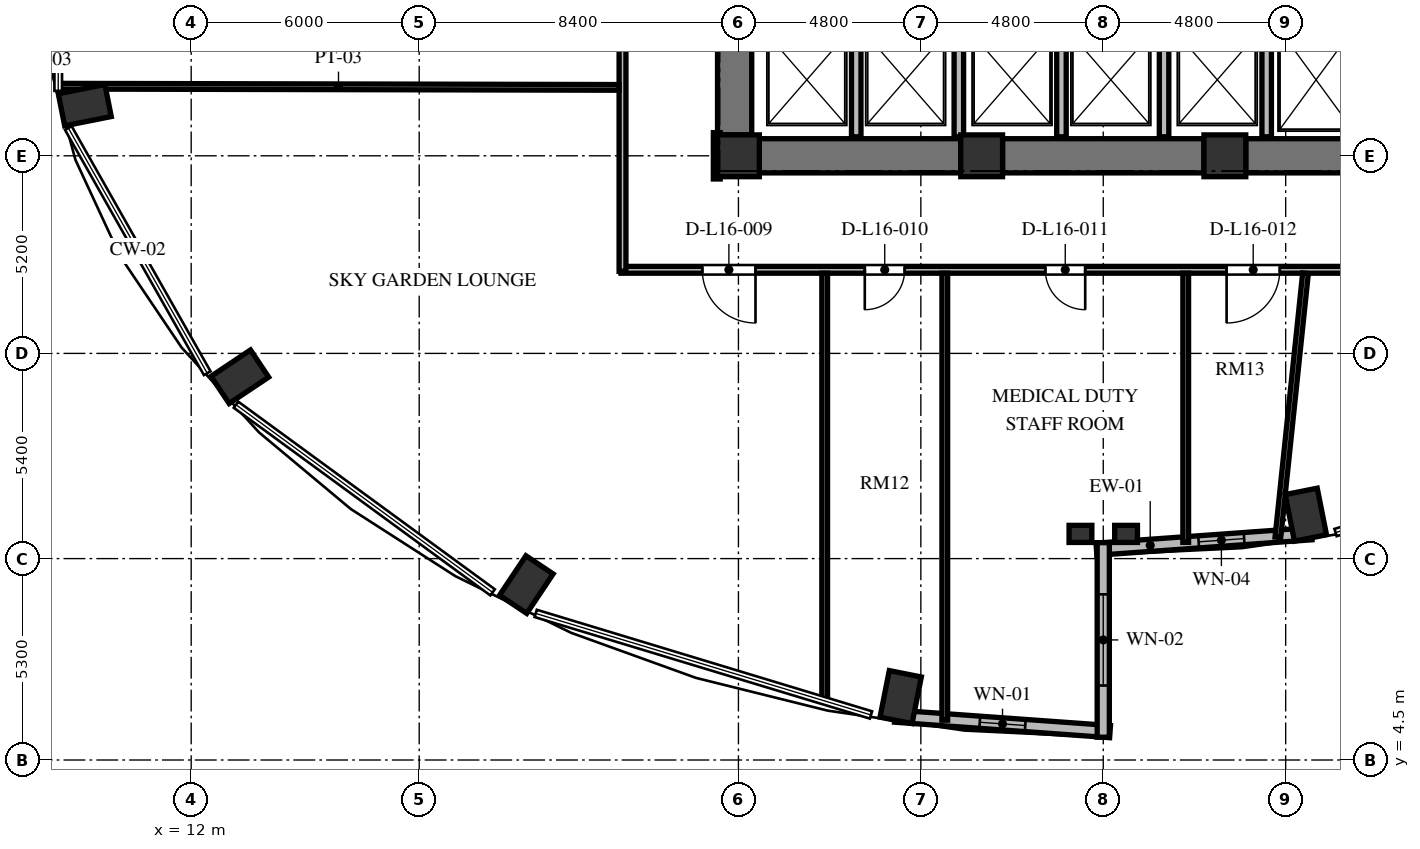
"""IFC4 building model, lengths in metres.
Left out: names, types, materials, properties, quantities, classifications, styles, units other than length and angle.
Written with IfcOpenShell. Run it as: python <this file> out.ifc"""

import sys

from ifc_helpers import new_model, si_unit, direction, frame, frame_2d, origin, origin_2d, place, context, subcontext, project, spatial, rectangle, extrude, element, fill, save


model = new_model("IFC4")
c1 = context("Model", 3, precision=1e-05, world=origin(), true_north=direction((0.0, 1.0)))
c2 = subcontext(c1, "Body", "Model", "MODEL_VIEW")
j1 = project(units=[si_unit("LENGTHUNIT", "METRE"), si_unit("PLANEANGLEUNIT", "RADIAN")], contexts=[c1])
p1 = place(None, origin())
s1 = spatial("IfcSite", under=j1, at=p1, CompositionType="ELEMENT")
p2 = place(p1, origin())
s2 = spatial("IfcBuilding", under=s1, at=p2, CompositionType="ELEMENT")
p3 = place(p2, frame((0.0, 0.0, 65.328)))
s3 = spatial("IfcBuildingStorey", under=s2, at=p3, CompositionType="ELEMENT", Elevation=65.328)
for number, where, z_axis, x_axis in (
    (1, (41.331, 10.956, 0.0), (0.0, 0.0, 1.0), (0.195, -0.981, 0.0)),
    (2, (9.2, 21.732, 0.0), (0.0, 0.0, 1.0), (-0.981, -0.195, 0.0)),
    (3, (13.28, 14.586, 0.0), (0.0, 0.0, 1.0), (-0.831, -0.556, 0.0)),
    (4, (20.819, 9.116, 0.0), (0.0, 0.0, 1.0), (-0.556, -0.831, 0.0)),
    (5, (30.669, 6.156, 0.0), (0.0, 0.0, 1.0), (-0.195, -0.981, 0.0)),
):
    element("IfcColumn", number, at=place(p3, frame(where, z_axis=z_axis, x_axis=x_axis)), inside=s3, PredefinedType="COLUMN", context=c2, shape_type="SweptSolid", body=[
        extrude(rectangle(XDim=1.25, YDim=0.86, at=origin_2d()), origin(), (0.0, 0.0, 1.0), 3.648),
    ])
for number, where, z_axis, x_axis in (
    (6, (26.4, 20.4, 0.0), (0.0, 0.0, 1.0), (1.0, 0.0, 0.0)),
    (7, (32.8, 20.4, 0.0), (0.0, 0.0, 1.0), (1.0, 0.0, 0.0)),
    (8, (39.2, 20.4, 0.0), (0.0, 0.0, 1.0), (1.0, 0.0, 0.0)),
):
    element("IfcColumn", number, at=place(p3, frame(where, z_axis=z_axis, x_axis=x_axis)), inside=s3, PredefinedType="COLUMN", context=c2, shape_type="SweptSolid", body=[
        extrude(rectangle(XDim=1.1, YDim=1.1, at=origin_2d()), origin(), (0.0, 0.0, 1.0), 3.648),
    ])
for number, where, z_axis, x_axis in (
    (9, (35.4, 10.45, 0.0), (0.0, 0.0, 1.0), (1.0, 0.0, 0.0)),
    (10, (36.6, 10.45, 0.0), (0.0, 0.0, 1.0), (1.0, 0.0, 0.0)),
):
    element("IfcColumn", number, at=place(p3, frame(where, z_axis=z_axis, x_axis=x_axis)), inside=s3, PredefinedType="PILASTER", context=c2, shape_type="SweptSolid", body=[
        extrude(rectangle(XDim=0.6, YDim=0.45, at=origin_2d()), origin(), (0.0, 0.0, 1.0), 3.648),
    ])
p4 = place(p3, frame((26.3, 20.95, 0.0), z_axis=(0.0, 0.0, 1.0), x_axis=(0.0, 1.0, 0.0)))
e11 = element("IfcWall", 11, at=p4, inside=s3, PredefinedType="SHEAR", context=c2, shape_type="SweptSolid", body=[
    extrude(rectangle(XDim=14.1, YDim=0.9, at=frame_2d((7.05, 0.0))), origin(), (0.0, 0.0, 1.0), 3.648),
])
p5 = place(p4, frame((6.5, 0.0, 0.0)))
e12 = element("IfcOpeningElement", 12, at=p5, cuts=e11, PredefinedType="OPENING", context=c2, shape_type="SweptSolid", body=[
    extrude(rectangle(XDim=1.2, YDim=2.15, at=frame_2d((0.6, 1.075))), frame((0.0, 0.46, 0.0), z_axis=(0.0, -1.0, 0.0), x_axis=(1.0, 0.0, 0.0)), (0.0, 0.0, 1.0), 0.92),
])
p6 = place(p4, frame((9.6, 0.0, 0.0)))
e13 = element("IfcOpeningElement", 13, at=p6, cuts=e11, PredefinedType="OPENING", context=c2, shape_type="SweptSolid", body=[
    extrude(rectangle(XDim=1.3, YDim=2.2, at=frame_2d((0.65, 1.1))), frame((0.0, 0.46, 0.0), z_axis=(0.0, -1.0, 0.0), x_axis=(1.0, 0.0, 0.0)), (0.0, 0.0, 1.0), 0.92),
])
p7 = place(p4, frame((3.26, 0.0, 0.0)))
e14 = element("IfcOpeningElement", 14, at=p7, cuts=e11, PredefinedType="OPENING", context=c2, shape_type="SweptSolid", body=[
    extrude(rectangle(XDim=1.3, YDim=2.2, at=frame_2d((0.65, 1.1))), frame((0.0, 0.46, 0.0), z_axis=(0.0, -1.0, 0.0), x_axis=(1.0, 0.0, 0.0)), (0.0, 0.0, 1.0), 0.92),
])
p8 = place(p3, frame((26.95, 20.4, 0.0), z_axis=(0.0, 0.0, 1.0), x_axis=(1.0, 0.0, 0.0)))
e15 = element("IfcWall", 15, at=p8, inside=s3, PredefinedType="SHEAR", context=c2, shape_type="SweptSolid", body=[
    extrude(rectangle(XDim=5.3, YDim=0.9, at=frame_2d((2.65, 0.0))), origin(), (0.0, 0.0, 1.0), 3.648),
])
p9 = place(p3, frame((33.35, 20.4, 0.0), z_axis=(0.0, 0.0, 1.0), x_axis=(1.0, 0.0, 0.0)))
e16 = element("IfcWall", 16, at=p9, inside=s3, PredefinedType="SHEAR", context=c2, shape_type="SweptSolid", body=[
    extrude(rectangle(XDim=5.3, YDim=0.9, at=frame_2d((2.65, 0.0))), origin(), (0.0, 0.0, 1.0), 3.648),
])
p10 = place(p3, frame((39.75, 20.4, 0.0), z_axis=(0.0, 0.0, 1.0), x_axis=(1.0, 0.0, 0.0)))
e17 = element("IfcWall", 17, at=p10, inside=s3, PredefinedType="SHEAR", context=c2, shape_type="SweptSolid", body=[
    extrude(rectangle(XDim=5.3, YDim=0.9, at=frame_2d((2.65, 0.0))), origin(), (0.0, 0.0, 1.0), 3.648),
])
p11 = place(p3, frame((35.821, 10.047, 0.0), z_axis=(0.0, 0.0, 1.0), x_axis=(0.997422321809, 0.071754525696, 0.0)))
e18 = element("IfcWall", 18, at=p11, inside=s3, PredefinedType="SOLIDWALL", context=c2, shape_type="SweptSolid", body=[
    extrude(rectangle(XDim=5.675, YDim=0.32, at=frame_2d((2.838, 0.0))), origin(), (0.0, 0.0, 1.0), 3.428),
])
p12 = place(p11, frame((2.697, 0.0, 0.85)))
e19 = element("IfcOpeningElement", 19, at=p12, cuts=e18, PredefinedType="OPENING", context=c2, shape_type="SweptSolid", body=[
    extrude(rectangle(XDim=1.2, YDim=1.8, at=frame_2d((0.6, 0.9))), frame((0.0, 0.17, 0.0), z_axis=(0.0, -1.0, 0.0), x_axis=(1.0, 0.0, 0.0)), (0.0, 0.0, 1.0), 0.34),
])
p13 = place(p3, frame((30.519, 5.654, 0.0), z_axis=(0.0, 0.0, 1.0), x_axis=(0.997421878774, -0.071760683825, 0.0)))
e20 = element("IfcWall", 20, at=p13, inside=s3, PredefinedType="SOLIDWALL", context=c2, shape_type="SweptSolid", body=[
    extrude(rectangle(XDim=5.675, YDim=0.32, at=frame_2d((2.837, 0.0))), origin(), (0.0, 0.0, 1.0), 3.428),
])
p14 = place(p13, frame((2.237, 0.0, 0.85)))
e21 = element("IfcOpeningElement", 21, at=p14, cuts=e20, PredefinedType="OPENING", context=c2, shape_type="SweptSolid", body=[
    extrude(rectangle(XDim=1.2, YDim=2.2, at=frame_2d((0.6, 1.1))), frame((0.0, 0.17, 0.0), z_axis=(0.0, -1.0, 0.0), x_axis=(1.0, 0.0, 0.0)), (0.0, 0.0, 1.0), 0.34),
])
p15 = place(p3, frame((36.0, 5.1, 0.0), z_axis=(0.0, 0.0, 1.0), x_axis=(0.0, 1.0, 0.0)))
e22 = element("IfcWall", 22, at=p15, inside=s3, PredefinedType="SOLIDWALL", context=c2, shape_type="SweptSolid", body=[
    extrude(rectangle(XDim=5.12, YDim=0.32, at=frame_2d((2.56, 0.0))), origin(), (0.0, 0.0, 1.0), 3.428),
])
p16 = place(p15, frame((1.36, 0.0, 0.84)))
e23 = element("IfcOpeningElement", 23, at=p16, cuts=e22, PredefinedType="OPENING", context=c2, shape_type="SweptSolid", body=[
    extrude(rectangle(XDim=2.4, YDim=2.04, at=frame_2d((1.2, 1.02))), frame((0.0, 0.17, 0.0), z_axis=(0.0, -1.0, 0.0), x_axis=(1.0, 0.0, 0.0)), (0.0, 0.0, 1.0), 0.34),
])
for number, where, z_axis, x_axis in (
    (24, (29.5, 20.9, 0.0), (0.0, 0.0, 1.0), (0.0, 1.0, 0.0)),
    (25, (32.2, 20.9, 0.0), (0.0, 0.0, 1.0), (0.0, 1.0, 0.0)),
    (26, (34.9, 20.9, 0.0), (0.0, 0.0, 1.0), (0.0, 1.0, 0.0)),
    (27, (37.6, 20.9, 0.0), (0.0, 0.0, 1.0), (0.0, 1.0, 0.0)),
    (28, (40.3, 20.9, 0.0), (0.0, 0.0, 1.0), (0.0, 1.0, 0.0)),
):
    element("IfcWall", number, at=place(p3, frame(where, z_axis=z_axis, x_axis=x_axis)), inside=s3, PredefinedType="SOLIDWALL", context=c2, shape_type="SweptSolid", body=[
        extrude(rectangle(XDim=2.8, YDim=0.25, at=frame_2d((1.4, 0.0))), origin(), (0.0, 0.0, 1.0), 3.428),
    ])
p17 = place(p3, frame((25.83, 21.01, 0.0), z_axis=(0.0, 0.0, 1.0), x_axis=(0.0, -1.0, 0.0)))
e29 = element("IfcWall", 29, at=p17, inside=s3, PredefinedType="PARTITIONING", context=c2, shape_type="SweptSolid", body=[
    extrude(rectangle(XDim=1.22, YDim=0.18, at=frame_2d((0.61, 0.0))), origin(), (0.0, 0.0, 1.0), 3.428),
])
p18 = place(p3, frame((45.24, 17.4, 0.0), z_axis=(0.0, 0.0, 1.0), x_axis=(-1.0, 0.0, 0.0)))
e30 = element("IfcWall", 30, at=p18, inside=s3, PredefinedType="PARTITIONING", context=c2, shape_type="SweptSolid", body=[
    extrude(rectangle(XDim=21.93, YDim=0.18, at=frame_2d((10.965, 0.0))), origin(), (0.0, 0.0, 1.0), 3.053),
])
p19 = place(p18, frame((18.391, 0.0, 0.0)))
e31 = element("IfcOpeningElement", 31, at=p19, cuts=e30, PredefinedType="OPENING", context=c2, shape_type="SweptSolid", body=[
    extrude(rectangle(XDim=1.4, YDim=2.2, at=frame_2d((0.7, 1.1))), frame((0.0, 0.1, 0.0), z_axis=(0.0, -1.0, 0.0), x_axis=(1.0, 0.0, 0.0)), (0.0, 0.0, 1.0), 0.2),
])
p20 = place(p18, frame((14.465, 0.0, 0.0)))
e32 = element("IfcOpeningElement", 32, at=p20, cuts=e30, PredefinedType="OPENING", context=c2, shape_type="SweptSolid", body=[
    extrude(rectangle(XDim=1.05, YDim=2.15, at=frame_2d((0.525, 1.075))), frame((0.0, 0.1, 0.0), z_axis=(0.0, -1.0, 0.0), x_axis=(1.0, 0.0, 0.0)), (0.0, 0.0, 1.0), 0.2),
])
p21 = place(p18, frame((9.715, 0.0, 0.0)))
e33 = element("IfcOpeningElement", 33, at=p21, cuts=e30, PredefinedType="OPENING", context=c2, shape_type="SweptSolid", body=[
    extrude(rectangle(XDim=1.05, YDim=2.15, at=frame_2d((0.525, 1.075))), frame((0.0, 0.1, 0.0), z_axis=(0.0, -1.0, 0.0), x_axis=(1.0, 0.0, 0.0)), (0.0, 0.0, 1.0), 0.2),
])
p22 = place(p18, frame((4.594, 0.0, 0.0)))
e34 = element("IfcOpeningElement", 34, at=p22, cuts=e30, PredefinedType="OPENING", context=c2, shape_type="SweptSolid", body=[
    extrude(rectangle(XDim=1.4, YDim=2.2, at=frame_2d((0.7, 1.1))), frame((0.0, 0.1, 0.0), z_axis=(0.0, -1.0, 0.0), x_axis=(1.0, 0.0, 0.0)), (0.0, 0.0, 1.0), 0.2),
])
p23 = place(p3, frame((23.35, 17.36, 0.0), z_axis=(0.0, 0.0, 1.0), x_axis=(0.0, 1.0, 0.0)))
e35 = element("IfcWall", 35, at=p23, inside=s3, PredefinedType="PARTITIONING", context=c2, shape_type="SweptSolid", body=[
    extrude(rectangle(XDim=9.28, YDim=0.18, at=frame_2d((4.64, 0.0))), origin(), (0.0, 0.0, 1.0), 3.428),
])
p24 = place(p3, frame((8.493, 22.231, 0.0), z_axis=(0.0, 0.0, 1.0), x_axis=(0.999997760873, -0.002116187438, 0.0)))
e36 = element("IfcWall", 36, at=p24, inside=s3, PredefinedType="PARTITIONING", context=c2, shape_type="SweptSolid", body=[
    extrude(rectangle(XDim=14.767, YDim=0.15, at=frame_2d((7.384, 0.0))), origin(), (0.0, 0.0, 1.0), 3.428),
])
p25 = place(p3, frame((28.67, 6.067, 0.0), z_axis=(0.0, 0.0, 1.0), x_axis=(0.0, 1.0, 0.0)))
e37 = element("IfcWall", 37, at=p25, inside=s3, PredefinedType="PARTITIONING", context=c2, shape_type="SweptSolid", body=[
    extrude(rectangle(XDim=11.243, YDim=0.15, at=frame_2d((5.622, 0.0))), origin(), (0.0, 0.0, 1.0), 3.428),
])
p26 = place(p3, frame((31.83, 5.548, 0.0), z_axis=(0.0, 0.0, 1.0), x_axis=(0.0, 1.0, 0.0)))
e38 = element("IfcWall", 38, at=p26, inside=s3, PredefinedType="PARTITIONING", context=c2, shape_type="SweptSolid", body=[
    extrude(rectangle(XDim=11.762, YDim=0.15, at=frame_2d((5.881, 0.0))), origin(), (0.0, 0.0, 1.0), 2.813),
])
p27 = place(p3, frame((38.17, 10.227, 0.0), z_axis=(0.0, 0.0, 1.0), x_axis=(0.0, 1.0, 0.0)))
e39 = element("IfcWall", 39, at=p27, inside=s3, PredefinedType="PARTITIONING", context=c2, shape_type="SweptSolid", body=[
    extrude(rectangle(XDim=7.083, YDim=0.15, at=frame_2d((3.542, 0.0))), origin(), (0.0, 0.0, 1.0), 3.428),
])
p28 = place(p3, frame((40.595, 10.359, 0.0), z_axis=(0.0, 0.0, 1.0), x_axis=(0.104057453244, 0.994571287754, 0.0)))
e40 = element("IfcWall", 40, at=p28, inside=s3, PredefinedType="PARTITIONING", context=c2, shape_type="SweptSolid", body=[
    extrude(rectangle(XDim=6.989, YDim=0.15, at=frame_2d((3.495, 0.0))), origin(), (0.0, 0.0, 1.0), 3.428),
])
p29 = place(p12, origin())
e41 = element("IfcWindow", 41, at=p29, inside=s3, PartitioningType="SINGLE_PANEL", PredefinedType="WINDOW", context=c2, shape_type="SweptSolid", body=[
    extrude(rectangle(XDim=1.2, YDim=1.8, at=frame_2d((0.6, 0.9))), frame((0.0, 0.03, 0.0), z_axis=(0.0, -1.0, 0.0), x_axis=(1.0, 0.0, 0.0)), (0.0, 0.0, 1.0), 0.06),
])
fill(e19, e41)
p30 = place(p14, origin())
e42 = element("IfcWindow", 42, at=p30, inside=s3, PartitioningType="SINGLE_PANEL", PredefinedType="WINDOW", context=c2, shape_type="SweptSolid", body=[
    extrude(rectangle(XDim=1.2, YDim=2.2, at=frame_2d((0.6, 1.1))), frame((0.0, 0.03, 0.0), z_axis=(0.0, -1.0, 0.0), x_axis=(1.0, 0.0, 0.0)), (0.0, 0.0, 1.0), 0.06),
])
fill(e21, e42)
p31 = place(p16, origin())
e43 = element("IfcWindow", 43, at=p31, inside=s3, PartitioningType="SINGLE_PANEL", PredefinedType="WINDOW", context=c2, shape_type="SweptSolid", body=[
    extrude(rectangle(XDim=2.4, YDim=2.04, at=frame_2d((1.2, 1.02))), frame((0.0, 0.03, 0.0), z_axis=(0.0, -1.0, 0.0), x_axis=(1.0, 0.0, 0.0)), (0.0, 0.0, 1.0), 0.06),
])
fill(e23, e43)
p32 = place(p19, origin())
e44 = element("IfcDoor", 44, at=p32, inside=s3, OperationType="SINGLE_SWING_LEFT", PredefinedType="DOOR", context=c2, shape_type="SweptSolid", body=[
    extrude(rectangle(XDim=1.4, YDim=2.2, at=frame_2d((0.7, 1.1))), frame((0.0, 0.025, 0.0), z_axis=(0.0, -1.0, 0.0), x_axis=(1.0, 0.0, 0.0)), (0.0, 0.0, 1.0), 0.05),
])
fill(e31, e44)
p33 = place(p20, origin())
e45 = element("IfcDoor", 45, at=p33, inside=s3, OperationType="SINGLE_SWING_RIGHT", PredefinedType="DOOR", context=c2, shape_type="SweptSolid", body=[
    extrude(rectangle(XDim=1.05, YDim=2.15, at=frame_2d((0.525, 1.075))), frame((0.0, 0.025, 0.0), z_axis=(0.0, -1.0, 0.0), x_axis=(1.0, 0.0, 0.0)), (0.0, 0.0, 1.0), 0.05),
])
fill(e32, e45)
p34 = place(p21, origin())
e46 = element("IfcDoor", 46, at=p34, inside=s3, OperationType="SINGLE_SWING_LEFT", PredefinedType="DOOR", context=c2, shape_type="SweptSolid", body=[
    extrude(rectangle(XDim=1.05, YDim=2.15, at=frame_2d((0.525, 1.075))), frame((0.0, 0.025, 0.0), z_axis=(0.0, -1.0, 0.0), x_axis=(1.0, 0.0, 0.0)), (0.0, 0.0, 1.0), 0.05),
])
fill(e33, e46)
p35 = place(p22, origin())
e47 = element("IfcDoor", 47, at=p35, inside=s3, OperationType="SINGLE_SWING_RIGHT", PredefinedType="DOOR", context=c2, shape_type="SweptSolid", body=[
    extrude(rectangle(XDim=1.4, YDim=2.2, at=frame_2d((0.7, 1.1))), frame((0.0, 0.025, 0.0), z_axis=(0.0, -1.0, 0.0), x_axis=(1.0, 0.0, 0.0)), (0.0, 0.0, 1.0), 0.05),
])
fill(e34, e47)
save(model, sys.argv[1])
